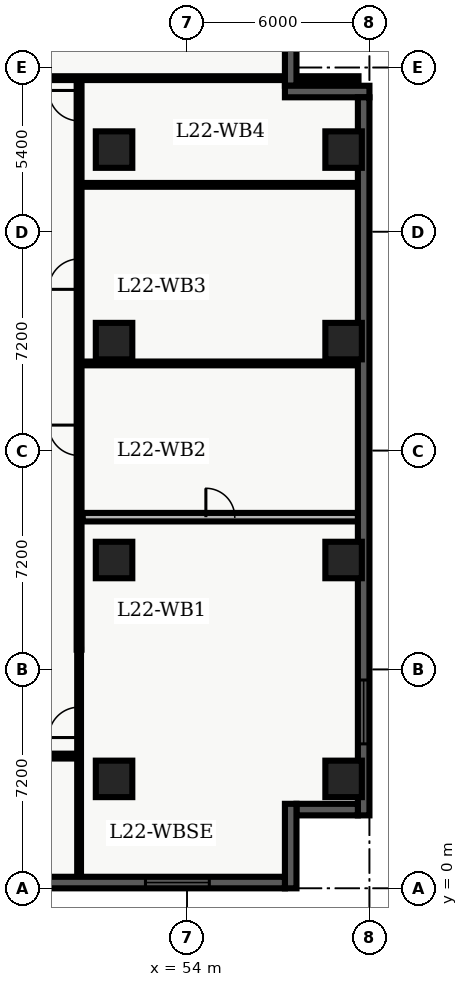
"""IFC4 building model, lengths in metres.
Left out: names, types, materials, properties, quantities, classifications, styles, units other than length and angle.
Written with IfcOpenShell. Run it as: python <this file> out.ifc"""

import sys

from ifc_helpers import new_model, entity, si_unit, converted_unit, direction, frame, origin_with_axes, origin_2d_with_axis, place, context, subcontext, project, spatial, polyline, rectangle, outline, extrude, element, fill, save


model = new_model("IFC4")
c1 = context("Model", 3, precision=1e-05, world=origin_with_axes(), true_north=direction((0.0, 1.0)))
c2 = subcontext(c1, "Body", "Model", "MODEL_VIEW")
j1 = project(units=[si_unit("LENGTHUNIT", "METRE"), converted_unit("PLANEANGLEUNIT", "DEGREE", entity("IfcPlaneAngleMeasure", 0.017), si_unit("PLANEANGLEUNIT", "RADIAN"), dimensions=[0, 0, 0, 0, 0, 0, 0])], contexts=[c1])
p1 = place(None, origin_with_axes())
s1 = spatial("IfcSite", under=j1, at=p1, CompositionType="ELEMENT")
p2 = place(p1, origin_with_axes())
s2 = spatial("IfcBuilding", under=s1, at=p2, CompositionType="ELEMENT")
p3 = place(p2, frame((0.0, 0.0, 93.0), z_axis=(0.0, 0.0, 1.0), x_axis=(1.0, 0.0, 0.0)))
s3 = spatial("IfcBuildingStorey", under=s2, at=p3, CompositionType="ELEMENT", Elevation=93.0)
for number, where, z_axis, x_axis in (
    (1, (51.6, 3.6, 0.0), (0.0, 0.0, 1.0), (1.0, 0.0, 0.0)),
    (2, (51.6, 10.8, 0.0), (0.0, 0.0, 1.0), (1.0, 0.0, 0.0)),
    (3, (51.6, 18.0, 0.0), (0.0, 0.0, 1.0), (1.0, 0.0, 0.0)),
    (4, (51.6, 24.3, 0.0), (0.0, 0.0, 1.0), (1.0, 0.0, 0.0)),
    (5, (59.15, 3.6, 0.0), (0.0, 0.0, 1.0), (1.0, 0.0, 0.0)),
    (6, (59.15, 10.8, 0.0), (0.0, 0.0, 1.0), (1.0, 0.0, 0.0)),
    (7, (59.15, 18.0, 0.0), (0.0, 0.0, 1.0), (1.0, 0.0, 0.0)),
    (8, (59.15, 24.3, 0.0), (0.0, 0.0, 1.0), (1.0, 0.0, 0.0)),
):
    element("IfcColumn", number, at=place(p3, frame(where, z_axis=z_axis, x_axis=x_axis)), inside=s3, PredefinedType="COLUMN", context=c2, shape_type="SweptSolid", body=[
        extrude(rectangle(XDim=1.2, YDim=1.2, at=origin_2d_with_axis()), origin_with_axes(), (0.0, 0.0, 1.0), 3.9),
    ])
p4 = place(p3, frame((50.45, 7.85, 0.0), z_axis=(0.0, 0.0, 1.0), x_axis=(0.0, 1.0, 0.0)))
e9 = element("IfcWall", 9, at=p4, inside=s3, PredefinedType="PARTITIONING", context=c2, shape_type="SweptSolid", body=[
    extrude(outline(polyline([(0.0, -0.08), (18.8, -0.08), (18.8, 0.08), (0.0, 0.08), (0.0, -0.08)])), origin_with_axes(), (0.0, 0.0, 1.0), 2.7),
])
p5 = place(p4, frame((6.888, 0.0, 0.0), z_axis=(0.0, 0.0, 1.0), x_axis=(1.0, 0.0, 0.0)))
e10 = element("IfcOpeningElement", 10, at=p5, cuts=e9, PredefinedType="OPENING", context=c2, shape_type="SweptSolid", body=[
    extrude(rectangle(XDim=1.0, YDim=0.18, at=origin_2d_with_axis()), origin_with_axes(), (0.0, 0.0, 1.0), 2.15),
])
p6 = place(p4, frame((12.353, 0.0, 0.0), z_axis=(0.0, 0.0, 1.0), x_axis=(1.0, 0.0, 0.0)))
e11 = element("IfcOpeningElement", 11, at=p6, cuts=e9, PredefinedType="OPENING", context=c2, shape_type="SweptSolid", body=[
    extrude(rectangle(XDim=1.0, YDim=0.18, at=origin_2d_with_axis()), origin_with_axes(), (0.0, 0.0, 1.0), 2.15),
])
p7 = place(p4, frame((17.895, 0.0, 0.0), z_axis=(0.0, 0.0, 1.0), x_axis=(1.0, 0.0, 0.0)))
e12 = element("IfcOpeningElement", 12, at=p7, cuts=e9, PredefinedType="OPENING", context=c2, shape_type="SweptSolid", body=[
    extrude(rectangle(XDim=1.0, YDim=0.18, at=origin_2d_with_axis()), origin_with_axes(), (0.0, 0.0, 1.0), 2.15),
])
p8 = place(p3, frame((38.76, 26.65, 0.0), z_axis=(0.0, 0.0, 1.0), x_axis=(1.0, 0.0, 0.0)))
e13 = element("IfcWall", 13, at=p8, inside=s3, PredefinedType="PARTITIONING", context=c2, shape_type="SweptSolid", body=[
    extrude(outline(polyline([(0.0, -0.062), (20.88, -0.062), (20.88, 0.062), (0.0, 0.062), (0.0, -0.062)])), origin_with_axes(), (0.0, 0.0, 1.0), 2.7),
])
p9 = place(p8, frame((4.24, 0.0, 0.0), z_axis=(0.0, 0.0, 1.0), x_axis=(1.0, 0.0, 0.0)))
e14 = element("IfcOpeningElement", 14, at=p9, cuts=e13, PredefinedType="OPENING", context=c2, shape_type="SweptSolid", body=[
    extrude(rectangle(XDim=1.0, YDim=0.145, at=origin_2d_with_axis()), origin_with_axes(), (0.0, 0.0, 1.0), 2.15),
])
p10 = place(p3, frame((44.55, 4.35, 0.0), z_axis=(0.0, 0.0, 1.0), x_axis=(1.0, 0.0, 0.0)))
e15 = element("IfcWall", 15, at=p10, inside=s3, PredefinedType="PARTITIONING", context=c2, shape_type="SweptSolid", body=[
    extrude(outline(polyline([(0.0, -0.08), (5.9, -0.08), (5.9, 0.08), (0.0, 0.08), (0.0, -0.08)])), origin_with_axes(), (0.0, 0.0, 1.0), 2.7),
])
p11 = place(p10, frame((1.7, 0.0, 0.0), z_axis=(0.0, 0.0, 1.0), x_axis=(1.0, 0.0, 0.0)))
e16 = element("IfcOpeningElement", 16, at=p11, cuts=e15, PredefinedType="OPENING", context=c2, shape_type="SweptSolid", body=[
    extrude(rectangle(XDim=1.0, YDim=0.18, at=origin_2d_with_axis()), origin_with_axes(), (0.0, 0.0, 1.0), 2.15),
])
p12 = place(p3, frame((50.45, 0.36, 0.0), z_axis=(0.0, 0.0, 1.0), x_axis=(0.0, 1.0, 0.0)))
e17 = element("IfcWall", 17, at=p12, inside=s3, PredefinedType="PARTITIONING", context=c2, shape_type="SweptSolid", body=[
    extrude(outline(polyline([(0.0, -0.062), (7.49, -0.062), (7.49, 0.062), (0.0, 0.062), (0.0, -0.062)])), origin_with_axes(), (0.0, 0.0, 1.0), 2.7),
])
p13 = place(p12, frame((5.1, 0.0, 0.0), z_axis=(0.0, 0.0, 1.0), x_axis=(1.0, 0.0, 0.0)))
e18 = element("IfcOpeningElement", 18, at=p13, cuts=e17, PredefinedType="OPENING", context=c2, shape_type="SweptSolid", body=[
    extrude(rectangle(XDim=1.0, YDim=0.145, at=origin_2d_with_axis()), origin_with_axes(), (0.0, 0.0, 1.0), 2.15),
])
p14 = place(p3, frame((50.57, 12.209, 0.0), z_axis=(0.0, 0.0, 1.0), x_axis=(1.0, 0.0, 0.0)))
e19 = element("IfcWall", 19, at=p14, inside=s3, PredefinedType="PARTITIONING", context=c2, shape_type="SweptSolid", body=[
    extrude(outline(polyline([(0.0, -0.14), (9.055, -0.14), (9.055, 0.14), (0.0, 0.14), (0.0, -0.14)])), origin_with_axes(), (0.0, 0.0, 1.0), 2.7),
])
p15 = place(p14, frame((4.525, 0.0, 0.0), z_axis=(0.0, 0.0, 1.0), x_axis=(1.0, 0.0, 0.0)))
e20 = element("IfcOpeningElement", 20, at=p15, cuts=e19, PredefinedType="OPENING", context=c2, shape_type="SweptSolid", body=[
    extrude(rectangle(XDim=0.95, YDim=0.3, at=origin_2d_with_axis()), origin_with_axes(), (0.0, 0.0, 1.0), 2.15),
])
for number, where, z_axis, x_axis in (
    (21, (50.57, 17.266, 0.0), (0.0, 0.0, 1.0), (1.0, 0.0, 0.0)),
    (22, (50.57, 23.14, 0.0), (0.0, 0.0, 1.0), (1.0, 0.0, 0.0)),
):
    element("IfcWall", number, at=place(p3, frame(where, z_axis=z_axis, x_axis=x_axis)), inside=s3, PredefinedType="PARTITIONING", context=c2, shape_type="SweptSolid", body=[
        extrude(outline(polyline([(0.0, -0.062), (9.055, -0.062), (9.055, 0.062), (0.0, 0.062), (0.0, -0.062)])), origin_with_axes(), (0.0, 0.0, 1.0), 2.7),
    ])
p16 = place(p3, frame((57.41, 28.42, 0.0), z_axis=(0.0, 0.0, 1.0), x_axis=(0.0, -1.0, 0.0)))
e23 = element("IfcWall", 23, at=p16, inside=s3, PredefinedType="SOLIDWALL", context=c2, shape_type="SweptSolid", body=[
    extrude(outline(polyline([(0.0, -0.19), (2.02, -0.19), (2.02, 0.19), (0.0, 0.19), (0.0, -0.19)])), origin_with_axes(), (0.0, 0.0, 1.0), 3.66),
])
p17 = place(p3, frame((57.22, 26.21, 0.0), z_axis=(0.0, 0.0, 1.0), x_axis=(1.0, 0.0, 0.0)))
e24 = element("IfcWall", 24, at=p17, inside=s3, PredefinedType="SOLIDWALL", context=c2, shape_type="SweptSolid", body=[
    extrude(outline(polyline([(0.0, -0.19), (2.78, -0.19), (2.78, 0.19), (0.0, 0.19), (0.0, -0.19)])), origin_with_axes(), (0.0, 0.0, 1.0), 3.66),
])
p18 = place(p3, frame((59.81, 26.02, 0.0), z_axis=(0.0, 0.0, 1.0), x_axis=(0.0, -1.0, 0.0)))
e25 = element("IfcWall", 25, at=p18, inside=s3, PredefinedType="SOLIDWALL", context=c2, shape_type="SweptSolid", body=[
    extrude(outline(polyline([(0.0, -0.19), (23.62, -0.19), (23.62, 0.19), (0.0, 0.19), (0.0, -0.19)])), origin_with_axes(), (0.0, 0.0, 1.0), 3.66),
])
p19 = place(p18, frame((20.218, 0.0, 0.45), z_axis=(0.0, 0.0, 1.0), x_axis=(1.0, 0.0, 0.0)))
e26 = element("IfcOpeningElement", 26, at=p19, cuts=e25, PredefinedType="OPENING", context=c2, shape_type="SweptSolid", body=[
    extrude(rectangle(XDim=2.1, YDim=0.4, at=origin_2d_with_axis()), origin_with_axes(), (0.0, 0.0, 1.0), 2.2),
])
p20 = place(p3, frame((59.62, 2.59, 0.0), z_axis=(0.0, 0.0, 1.0), x_axis=(-1.0, 0.0, 0.0)))
e27 = element("IfcWall", 27, at=p20, inside=s3, PredefinedType="SOLIDWALL", context=c2, shape_type="SweptSolid", body=[
    extrude(outline(polyline([(0.0, -0.19), (2.02, -0.19), (2.02, 0.19), (0.0, 0.19), (0.0, -0.19)])), origin_with_axes(), (0.0, 0.0, 1.0), 3.66),
])
p21 = place(p3, frame((57.41, 2.78, 0.0), z_axis=(0.0, 0.0, 1.0), x_axis=(0.0, -1.0, 0.0)))
e28 = element("IfcWall", 28, at=p21, inside=s3, PredefinedType="SOLIDWALL", context=c2, shape_type="SweptSolid", body=[
    extrude(outline(polyline([(0.0, -0.19), (2.78, -0.19), (2.78, 0.19), (0.0, 0.19), (0.0, -0.19)])), origin_with_axes(), (0.0, 0.0, 1.0), 3.66),
])
p22 = place(p3, frame((57.22, 0.19, 0.0), z_axis=(0.0, 0.0, 1.0), x_axis=(-1.0, 0.0, 0.0)))
e29 = element("IfcWall", 29, at=p22, inside=s3, PredefinedType="SOLIDWALL", context=c2, shape_type="SweptSolid", body=[
    extrude(outline(polyline([(0.0, -0.19), (18.82, -0.19), (18.82, 0.19), (0.0, 0.19), (0.0, -0.19)])), origin_with_axes(), (0.0, 0.0, 1.0), 3.66),
])
p23 = place(p22, frame((3.537, 0.0, 0.45), z_axis=(0.0, 0.0, 1.0), x_axis=(1.0, 0.0, 0.0)))
e30 = element("IfcOpeningElement", 30, at=p23, cuts=e29, PredefinedType="OPENING", context=c2, shape_type="SweptSolid", body=[
    extrude(rectangle(XDim=2.1, YDim=0.4, at=origin_2d_with_axis()), origin_with_axes(), (0.0, 0.0, 1.0), 2.2),
])
p24 = place(p22, frame((9.41, 0.0, 0.45), z_axis=(0.0, 0.0, 1.0), x_axis=(1.0, 0.0, 0.0)))
e31 = element("IfcOpeningElement", 31, at=p24, cuts=e29, PredefinedType="OPENING", context=c2, shape_type="SweptSolid", body=[
    extrude(rectangle(XDim=2.1, YDim=0.4, at=origin_2d_with_axis()), origin_with_axes(), (0.0, 0.0, 1.0), 2.2),
])
p25 = place(p22, frame((15.283, 0.0, 0.45), z_axis=(0.0, 0.0, 1.0), x_axis=(1.0, 0.0, 0.0)))
e32 = element("IfcOpeningElement", 32, at=p25, cuts=e29, PredefinedType="OPENING", context=c2, shape_type="SweptSolid", body=[
    extrude(rectangle(XDim=2.1, YDim=0.4, at=origin_2d_with_axis()), origin_with_axes(), (0.0, 0.0, 1.0), 2.2),
])
p26 = place(p12, frame((5.1, 0.0, 0.0), z_axis=(0.0, 0.0, 1.0), x_axis=(1.0, 0.0, 0.0)))
e33 = element("IfcDoor", 33, at=p26, inside=s3, OperationType="SINGLE_SWING_LEFT", PredefinedType="DOOR", context=c2, shape_type="SweptSolid", body=[
    extrude(rectangle(XDim=1.0, YDim=0.075, at=origin_2d_with_axis()), origin_with_axes(), (0.0, 0.0, 1.0), 2.15),
])
fill(e18, e33)
p27 = place(p14, frame((4.525, 0.0, 0.0), z_axis=(0.0, 0.0, 1.0), x_axis=(1.0, 0.0, 0.0)))
e34 = element("IfcDoor", 34, at=p27, inside=s3, OperationType="SINGLE_SWING_LEFT", PredefinedType="DOOR", context=c2, shape_type="SweptSolid", body=[
    extrude(rectangle(XDim=0.95, YDim=0.09, at=origin_2d_with_axis()), origin_with_axes(), (0.0, 0.0, 1.0), 2.15),
])
fill(e20, e34)
p28 = place(p4, frame((6.888, 0.0, 0.0), z_axis=(0.0, 0.0, 1.0), x_axis=(1.0, 0.0, 0.0)))
e35 = element("IfcDoor", 35, at=p28, inside=s3, OperationType="SINGLE_SWING_RIGHT", PredefinedType="DOOR", context=c2, shape_type="SweptSolid", body=[
    extrude(rectangle(XDim=1.0, YDim=0.09, at=origin_2d_with_axis()), origin_with_axes(), (0.0, 0.0, 1.0), 2.15),
])
fill(e10, e35)
p29 = place(p4, frame((12.353, 0.0, 0.0), z_axis=(0.0, 0.0, 1.0), x_axis=(1.0, 0.0, 0.0)))
e36 = element("IfcDoor", 36, at=p29, inside=s3, OperationType="SINGLE_SWING_LEFT", PredefinedType="DOOR", context=c2, shape_type="SweptSolid", body=[
    extrude(rectangle(XDim=1.0, YDim=0.09, at=origin_2d_with_axis()), origin_with_axes(), (0.0, 0.0, 1.0), 2.15),
])
fill(e11, e36)
p30 = place(p4, frame((17.895, 0.0, 0.0), z_axis=(0.0, 0.0, 1.0), x_axis=(1.0, 0.0, 0.0)))
e37 = element("IfcDoor", 37, at=p30, inside=s3, OperationType="SINGLE_SWING_RIGHT", PredefinedType="DOOR", context=c2, shape_type="SweptSolid", body=[
    extrude(rectangle(XDim=1.0, YDim=0.09, at=origin_2d_with_axis()), origin_with_axes(), (0.0, 0.0, 1.0), 2.15),
])
fill(e12, e37)
p31 = place(p18, frame((20.218, 0.0, 0.45), z_axis=(0.0, 0.0, 1.0), x_axis=(1.0, 0.0, 0.0)))
e38 = element("IfcWindow", 38, at=p31, inside=s3, PredefinedType="WINDOW", context=c2, shape_type="SweptSolid", body=[
    extrude(rectangle(XDim=2.1, YDim=0.09, at=origin_2d_with_axis()), origin_with_axes(), (0.0, 0.0, 1.0), 2.2),
])
fill(e26, e38)
p32 = place(p22, frame((3.537, 0.0, 0.45), z_axis=(0.0, 0.0, 1.0), x_axis=(1.0, 0.0, 0.0)))
e39 = element("IfcWindow", 39, at=p32, inside=s3, PredefinedType="WINDOW", context=c2, shape_type="SweptSolid", body=[
    extrude(rectangle(XDim=2.1, YDim=0.09, at=origin_2d_with_axis()), origin_with_axes(), (0.0, 0.0, 1.0), 2.2),
])
fill(e30, e39)
save(model, sys.argv[1])
